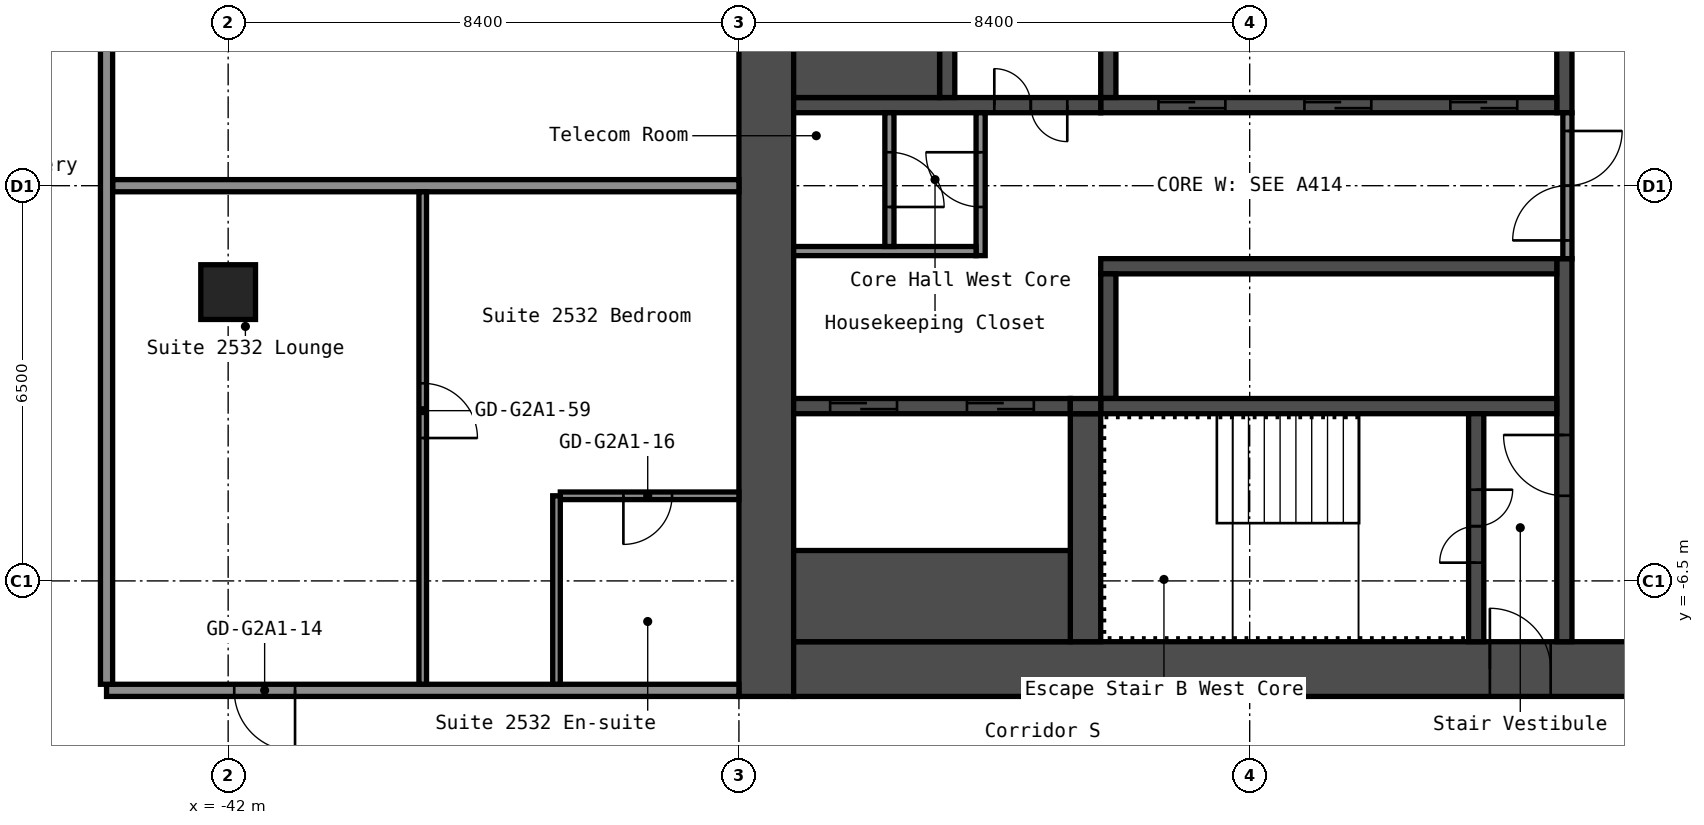
"""IFC4 building model, lengths in metres.
Left out: names, types, materials, properties, quantities, classifications, styles, units other than length and angle.
Written with IfcOpenShell. Run it as: python <this file> out.ifc"""

import sys

from ifc_helpers import new_model, si_unit, direction, frame, frame_2d, origin, origin_2d, place, context, subcontext, project, spatial, rectangle, hollow_rectangle, extrude, element, fill, save


model = new_model("IFC4")
c1 = context("Model", 3, precision=1e-05, world=origin(), true_north=direction((0.0, 1.0)))
c2 = subcontext(c1, "Body", "Model", "MODEL_VIEW")
j1 = project(units=[si_unit("LENGTHUNIT", "METRE"), si_unit("PLANEANGLEUNIT", "RADIAN")], contexts=[c1])
p1 = place(None, origin())
s1 = spatial("IfcSite", under=j1, at=p1, CompositionType="ELEMENT")
p2 = place(p1, origin())
s2 = spatial("IfcBuilding", under=s1, at=p2, CompositionType="ELEMENT")
p3 = place(p2, frame((0.0, 0.0, 91.4)))
s3 = spatial("IfcBuildingStorey", under=s2, at=p3, CompositionType="ELEMENT", Elevation=91.4)
p4 = place(p3, frame((-42.0, -1.75, 0.0), z_axis=(0.0, 0.0, 1.0), x_axis=(1.0, 0.0, 0.0)))
e1 = element("IfcColumn", 1, at=p4, inside=s3, PredefinedType="COLUMN", context=c2, shape_type="SweptSolid", body=[
    extrude(hollow_rectangle(XDim=0.9, YDim=0.9, WallThickness=0.036, at=origin_2d()), origin(), (0.0, 0.0, 1.0), 2.8),
])
p5 = place(p3, frame((-33.15, -8.4, 0.0), z_axis=(0.0, 0.0, 1.0), x_axis=(0.0, 1.0, 0.0)))
e2 = element("IfcWall", 2, at=p5, inside=s3, PredefinedType="SHEAR", context=c2, shape_type="SweptSolid", body=[
    extrude(rectangle(XDim=16.8, YDim=0.9, at=frame_2d((8.4, 0.0))), origin(), (0.0, 0.0, 1.0), 2.8),
])
p6 = place(p3, frame((-32.7, -7.95, 0.0), z_axis=(0.0, 0.0, 1.0), x_axis=(1.0, 0.0, 0.0)))
e3 = element("IfcWall", 3, at=p6, inside=s3, PredefinedType="SHEAR", context=c2, shape_type="SweptSolid", body=[
    extrude(rectangle(XDim=15.0, YDim=0.9, at=frame_2d((7.5, 0.0))), origin(), (0.0, 0.0, 1.0), 2.8),
])
p7 = place(p6, frame((11.45, 0.0, 0.0)))
e4 = element("IfcOpeningElement", 4, at=p7, cuts=e3, PredefinedType="OPENING", context=c2, shape_type="SweptSolid", body=[
    extrude(rectangle(XDim=1.0, YDim=2.1, at=frame_2d((0.5, 1.05))), frame((0.0, 0.46, 0.0), z_axis=(0.0, -1.0, 0.0), x_axis=(1.0, 0.0, 0.0)), (0.0, 0.0, 1.0), 0.92),
])
p8 = place(p3, frame((-20.025, 1.2, 0.0), z_axis=(0.0, 0.0, 1.0), x_axis=(0.0, 1.0, 0.0)))
e5 = element("IfcWall", 5, at=p8, inside=s3, PredefinedType="SHEAR", context=c2, shape_type="SweptSolid", body=[
    extrude(rectangle(XDim=6.3, YDim=0.25, at=frame_2d((3.15, 0.0))), origin(), (0.0, 0.0, 1.0), 2.8),
])
p9 = place(p3, frame((-20.025, -7.5, 0.0), z_axis=(0.0, 0.0, 1.0), x_axis=(0.0, 1.0, 0.0)))
e6 = element("IfcWall", 6, at=p9, inside=s3, PredefinedType="SHEAR", context=c2, shape_type="SweptSolid", body=[
    extrude(rectangle(XDim=6.3, YDim=0.25, at=frame_2d((3.15, 0.0))), origin(), (0.0, 0.0, 1.0), 2.8),
])
p10 = place(p9, frame((2.4, 0.0, 0.0)))
e7 = element("IfcOpeningElement", 7, at=p10, cuts=e6, PredefinedType="OPENING", context=c2, shape_type="SweptSolid", body=[
    extrude(rectangle(XDim=1.0, YDim=2.1, at=frame_2d((0.5, 1.05))), frame((0.0, 0.135, 0.0), z_axis=(0.0, -1.0, 0.0), x_axis=(1.0, 0.0, 0.0)), (0.0, 0.0, 1.0), 0.27),
])
p11 = place(p3, frame((-27.65, 1.325, 0.0), z_axis=(0.0, 0.0, 1.0), x_axis=(1.0, 0.0, 0.0)))
e8 = element("IfcWall", 8, at=p11, inside=s3, PredefinedType="SHEAR", context=c2, shape_type="SweptSolid", body=[
    extrude(rectangle(XDim=7.5, YDim=0.25, at=frame_2d((3.75, 0.0))), origin(), (0.0, 0.0, 1.0), 2.8),
])
p12 = place(p11, frame((5.75, 0.0, 0.0)))
e9 = element("IfcOpeningElement", 9, at=p12, cuts=e8, PredefinedType="OPENING", context=c2, shape_type="SweptSolid", body=[
    extrude(rectangle(XDim=1.1, YDim=2.1, at=frame_2d((0.55, 1.05))), frame((0.0, 0.135, 0.0), z_axis=(0.0, -1.0, 0.0), x_axis=(1.0, 0.0, 0.0)), (0.0, 0.0, 1.0), 0.27),
])
p13 = place(p11, frame((3.35, 0.0, 0.0)))
e10 = element("IfcOpeningElement", 10, at=p13, cuts=e8, PredefinedType="OPENING", context=c2, shape_type="SweptSolid", body=[
    extrude(rectangle(XDim=1.1, YDim=2.1, at=frame_2d((0.55, 1.05))), frame((0.0, 0.135, 0.0), z_axis=(0.0, -1.0, 0.0), x_axis=(1.0, 0.0, 0.0)), (0.0, 0.0, 1.0), 0.27),
])
p14 = place(p11, frame((0.95, 0.0, 0.0)))
e11 = element("IfcOpeningElement", 11, at=p14, cuts=e8, PredefinedType="OPENING", context=c2, shape_type="SweptSolid", body=[
    extrude(rectangle(XDim=1.1, YDim=2.1, at=frame_2d((0.55, 1.05))), frame((0.0, 0.135, 0.0), z_axis=(0.0, -1.0, 0.0), x_axis=(1.0, 0.0, 0.0)), (0.0, 0.0, 1.0), 0.27),
])
p15 = place(p3, frame((-27.525, 1.45, 0.0), z_axis=(0.0, 0.0, 1.0), x_axis=(0.0, 1.0, 0.0)))
e12 = element("IfcWall", 12, at=p15, inside=s3, PredefinedType="SHEAR", context=c2, shape_type="SweptSolid", body=[
    extrude(rectangle(XDim=2.05, YDim=0.25, at=frame_2d((1.025, 0.0))), origin(), (0.0, 0.0, 1.0), 2.8),
])
p16 = place(p3, frame((-32.7, 1.325, 0.0), z_axis=(0.0, 0.0, 1.0), x_axis=(1.0, 0.0, 0.0)))
e13 = element("IfcWall", 13, at=p16, inside=s3, PredefinedType="SHEAR", context=c2, shape_type="SweptSolid", body=[
    extrude(rectangle(XDim=5.05, YDim=0.25, at=frame_2d((2.525, 0.0))), origin(), (0.0, 0.0, 1.0), 2.8),
])
p17 = place(p16, frame((3.3, 0.0, 0.0)))
e14 = element("IfcOpeningElement", 14, at=p17, cuts=e13, PredefinedType="OPENING", context=c2, shape_type="SweptSolid", body=[
    extrude(rectangle(XDim=1.2, YDim=2.1, at=frame_2d((0.6, 1.05))), frame((0.0, 0.135, 0.0), z_axis=(0.0, -1.0, 0.0), x_axis=(1.0, 0.0, 0.0)), (0.0, 0.0, 1.0), 0.27),
])
p18 = place(p3, frame((-30.175, 1.45, 0.0), z_axis=(0.0, 0.0, 1.0), x_axis=(0.0, 1.0, 0.0)))
e15 = element("IfcWall", 15, at=p18, inside=s3, PredefinedType="SHEAR", context=c2, shape_type="SweptSolid", body=[
    extrude(rectangle(XDim=6.05, YDim=0.25, at=frame_2d((3.025, 0.0))), origin(), (0.0, 0.0, 1.0), 2.8),
])
p19 = place(p18, frame((2.625, 0.0, 0.0)))
e16 = element("IfcOpeningElement", 16, at=p19, cuts=e15, PredefinedType="OPENING", context=c2, shape_type="SweptSolid", body=[
    extrude(rectangle(XDim=1.1, YDim=2.1, at=frame_2d((0.55, 1.05))), frame((0.0, 0.135, 0.0), z_axis=(0.0, -1.0, 0.0), x_axis=(1.0, 0.0, 0.0)), (0.0, 0.0, 1.0), 0.27),
])
p20 = place(p3, frame((-32.7, 2.375, 0.0), z_axis=(0.0, 0.0, 1.0), x_axis=(1.0, 0.0, 0.0)))
e17 = element("IfcWall", 17, at=p20, inside=s3, PredefinedType="SHEAR", context=c2, shape_type="SweptSolid", body=[
    extrude(rectangle(XDim=2.4, YDim=1.85, at=frame_2d((1.2, 0.0))), origin(), (0.0, 0.0, 1.0), 2.8),
])
p21 = place(p3, frame((-27.65, -1.325, 0.0), z_axis=(0.0, 0.0, 1.0), x_axis=(1.0, 0.0, 0.0)))
e18 = element("IfcWall", 18, at=p21, inside=s3, PredefinedType="SHEAR", context=c2, shape_type="SweptSolid", body=[
    extrude(rectangle(XDim=7.5, YDim=0.25, at=frame_2d((3.75, 0.0))), origin(), (0.0, 0.0, 1.0), 2.8),
])
p22 = place(p3, frame((-27.525, -3.5, 0.0), z_axis=(0.0, 0.0, 1.0), x_axis=(0.0, 1.0, 0.0)))
e19 = element("IfcWall", 19, at=p22, inside=s3, PredefinedType="SHEAR", context=c2, shape_type="SweptSolid", body=[
    extrude(rectangle(XDim=2.05, YDim=0.25, at=frame_2d((1.025, 0.0))), origin(), (0.0, 0.0, 1.0), 2.8),
])
p23 = place(p3, frame((-27.65, -3.625, 0.0), z_axis=(0.0, 0.0, 1.0), x_axis=(1.0, 0.0, 0.0)))
e20 = element("IfcWall", 20, at=p23, inside=s3, PredefinedType="SHEAR", context=c2, shape_type="SweptSolid", body=[
    extrude(rectangle(XDim=7.5, YDim=0.25, at=frame_2d((3.75, 0.0))), origin(), (0.0, 0.0, 1.0), 2.8),
])
p24 = place(p3, frame((-21.475, -7.5, 0.0), z_axis=(0.0, 0.0, 1.0), x_axis=(0.0, 1.0, 0.0)))
e21 = element("IfcWall", 21, at=p24, inside=s3, PredefinedType="SHEAR", context=c2, shape_type="SweptSolid", body=[
    extrude(rectangle(XDim=3.75, YDim=0.25, at=frame_2d((1.875, 0.0))), origin(), (0.0, 0.0, 1.0), 2.8),
])
p25 = place(p24, frame((1.3, 0.0, 0.0)))
e22 = element("IfcOpeningElement", 22, at=p25, cuts=e21, PredefinedType="OPENING", context=c2, shape_type="SweptSolid", body=[
    extrude(rectangle(XDim=1.2, YDim=2.1, at=frame_2d((0.6, 1.05))), frame((0.0, 0.135, 0.0), z_axis=(0.0, -1.0, 0.0), x_axis=(1.0, 0.0, 0.0)), (0.0, 0.0, 1.0), 0.27),
])
p26 = place(p3, frame((-27.9, -7.5, 0.0), z_axis=(0.0, 0.0, 1.0), x_axis=(0.0, 1.0, 0.0)))
e23 = element("IfcWall", 23, at=p26, inside=s3, PredefinedType="SHEAR", context=c2, shape_type="SweptSolid", body=[
    extrude(rectangle(XDim=3.75, YDim=0.5, at=frame_2d((1.875, 0.0))), origin(), (0.0, 0.0, 1.0), 2.8),
])
p27 = place(p3, frame((-32.7, -3.625, 0.0), z_axis=(0.0, 0.0, 1.0), x_axis=(1.0, 0.0, 0.0)))
e24 = element("IfcWall", 24, at=p27, inside=s3, PredefinedType="SHEAR", context=c2, shape_type="SweptSolid", body=[
    extrude(rectangle(XDim=4.55, YDim=0.25, at=frame_2d((2.275, 0.0))), origin(), (0.0, 0.0, 1.0), 2.8),
])
p28 = place(p27, frame((2.85, 0.0, 0.0)))
e25 = element("IfcOpeningElement", 25, at=p28, cuts=e24, PredefinedType="OPENING", context=c2, shape_type="SweptSolid", body=[
    extrude(rectangle(XDim=1.1, YDim=2.1, at=frame_2d((0.55, 1.05))), frame((0.0, 0.135, 0.0), z_axis=(0.0, -1.0, 0.0), x_axis=(1.0, 0.0, 0.0)), (0.0, 0.0, 1.0), 0.27),
])
p29 = place(p27, frame((0.6, 0.0, 0.0)))
e26 = element("IfcOpeningElement", 26, at=p29, cuts=e24, PredefinedType="OPENING", context=c2, shape_type="SweptSolid", body=[
    extrude(rectangle(XDim=1.1, YDim=2.1, at=frame_2d((0.55, 1.05))), frame((0.0, 0.135, 0.0), z_axis=(0.0, -1.0, 0.0), x_axis=(1.0, 0.0, 0.0)), (0.0, 0.0, 1.0), 0.27),
])
p30 = place(p3, frame((-32.7, -6.75, 0.0), z_axis=(0.0, 0.0, 1.0), x_axis=(1.0, 0.0, 0.0)))
e27 = element("IfcWall", 27, at=p30, inside=s3, PredefinedType="SHEAR", context=c2, shape_type="SweptSolid", body=[
    extrude(rectangle(XDim=4.55, YDim=1.5, at=frame_2d((2.275, 0.0))), origin(), (0.0, 0.0, 1.0), 2.8),
])
p31 = place(p3, frame((-28.15, -3.625, 0.0), z_axis=(0.0, 0.0, 1.0), x_axis=(1.0, 0.0, 0.0)))
e28 = element("IfcWall", 28, at=p31, inside=s3, PredefinedType="SHEAR", context=c2, shape_type="SweptSolid", body=[
    extrude(rectangle(XDim=0.5, YDim=0.25, at=frame_2d((0.25, 0.0))), origin(), (0.0, 0.0, 1.0), 2.8),
])
p32 = place(p3, frame((-19.975, -1.2, 0.0), z_axis=(0.0, 0.0, 1.0), x_axis=(0.0, 1.0, 0.0)))
e29 = element("IfcWall", 29, at=p32, inside=s3, PredefinedType="PARTITIONING", context=c2, shape_type="SweptSolid", body=[
    extrude(rectangle(XDim=2.4, YDim=0.15, at=frame_2d((1.2, 0.0))), origin(), (0.0, 0.0, 1.0), 2.8),
])
p33 = place(p32, frame((0.3, 0.0, 0.0)))
e30 = element("IfcOpeningElement", 30, at=p33, cuts=e29, PredefinedType="OPENING", context=c2, shape_type="SweptSolid", body=[
    extrude(rectangle(XDim=1.8, YDim=2.1, at=frame_2d((0.9, 1.05))), frame((0.0, 0.085, 0.0), z_axis=(0.0, -1.0, 0.0), x_axis=(1.0, 0.0, 0.0)), (0.0, 0.0, 1.0), 0.17),
])
p34 = place(p3, frame((-29.625, -1.15, 0.0), z_axis=(0.0, 0.0, 1.0), x_axis=(0.0, 1.0, 0.0)))
e31 = element("IfcWall", 31, at=p34, inside=s3, PredefinedType="PARTITIONING", context=c2, shape_type="SweptSolid", body=[
    extrude(rectangle(XDim=2.35, YDim=0.15, at=frame_2d((1.175, 0.0))), origin(), (0.0, 0.0, 1.0), 2.8),
])
p35 = place(p34, frame((0.8, 0.0, 0.0)))
e32 = element("IfcOpeningElement", 32, at=p35, cuts=e31, PredefinedType="OPENING", context=c2, shape_type="SweptSolid", body=[
    extrude(rectangle(XDim=0.9, YDim=2.1, at=frame_2d((0.45, 1.05))), frame((0.0, 0.085, 0.0), z_axis=(0.0, -1.0, 0.0), x_axis=(1.0, 0.0, 0.0)), (0.0, 0.0, 1.0), 0.17),
])
p36 = place(p3, frame((-32.7, -1.075, 0.0), z_axis=(0.0, 0.0, 1.0), x_axis=(1.0, 0.0, 0.0)))
e33 = element("IfcWall", 33, at=p36, inside=s3, PredefinedType="PARTITIONING", context=c2, shape_type="SweptSolid", body=[
    extrude(rectangle(XDim=3.0, YDim=0.15, at=frame_2d((1.5, 0.0))), origin(), (0.0, 0.0, 1.0), 2.8),
])
p37 = place(p3, frame((-31.125, -1.0, 0.0), z_axis=(0.0, 0.0, 1.0), x_axis=(0.0, 1.0, 0.0)))
e34 = element("IfcWall", 34, at=p37, inside=s3, PredefinedType="PARTITIONING", context=c2, shape_type="SweptSolid", body=[
    extrude(rectangle(XDim=2.2, YDim=0.15, at=frame_2d((1.1, 0.0))), origin(), (0.0, 0.0, 1.0), 2.8),
])
p38 = place(p37, frame((0.65, 0.0, 0.0)))
e35 = element("IfcOpeningElement", 35, at=p38, cuts=e34, PredefinedType="OPENING", context=c2, shape_type="SweptSolid", body=[
    extrude(rectangle(XDim=0.9, YDim=2.1, at=frame_2d((0.45, 1.05))), frame((0.0, 0.085, 0.0), z_axis=(0.0, -1.0, 0.0), x_axis=(1.0, 0.0, 0.0)), (0.0, 0.0, 1.0), 0.17),
])
p39 = place(p3, frame((-44.0, -8.3, 0.0), z_axis=(0.0, 0.0, 1.0), x_axis=(1.0, 0.0, 0.0)))
e36 = element("IfcWall", 36, at=p39, inside=s3, PredefinedType="PARTITIONING", context=c2, shape_type="SweptSolid", body=[
    extrude(rectangle(XDim=10.4, YDim=0.2, at=frame_2d((5.2, 0.0))), origin(), (0.0, 0.0, 1.0), 2.8),
])
p40 = place(p39, frame((2.1, 0.0, 0.0)))
e37 = element("IfcOpeningElement", 37, at=p40, cuts=e36, PredefinedType="OPENING", context=c2, shape_type="SweptSolid", body=[
    extrude(rectangle(XDim=1.0, YDim=2.1, at=frame_2d((0.5, 1.05))), frame((0.0, 0.11, 0.0), z_axis=(0.0, -1.0, 0.0), x_axis=(1.0, 0.0, 0.0)), (0.0, 0.0, 1.0), 0.22),
])
p41 = place(p3, frame((-36.538, -5.1, 0.0), z_axis=(0.0, 0.0, 1.0), x_axis=(1.0, 0.0, 0.0)))
e38 = element("IfcWall", 38, at=p41, inside=s3, PredefinedType="PARTITIONING", context=c2, shape_type="SweptSolid", body=[
    extrude(rectangle(XDim=2.938, YDim=0.125, at=frame_2d((1.469, 0.0))), origin(), (0.0, 0.0, 1.0), 2.8),
])
p42 = place(p41, frame((1.038, 0.0, 0.0)))
e39 = element("IfcOpeningElement", 39, at=p42, cuts=e38, PredefinedType="OPENING", context=c2, shape_type="SweptSolid", body=[
    extrude(rectangle(XDim=0.8, YDim=2.1, at=frame_2d((0.4, 1.05))), frame((0.0, 0.073, 0.0), z_axis=(0.0, -1.0, 0.0), x_axis=(1.0, 0.0, 0.0)), (0.0, 0.0, 1.0), 0.145),
])
p43 = place(p3, frame((-43.9, 0.0, 0.0), z_axis=(0.0, 0.0, 1.0), x_axis=(1.0, 0.0, 0.0)))
e40 = element("IfcWall", 40, at=p43, inside=s3, PredefinedType="PARTITIONING", context=c2, shape_type="SweptSolid", body=[
    extrude(rectangle(XDim=10.3, YDim=0.2, at=frame_2d((5.15, 0.0))), origin(), (0.0, 0.0, 1.0), 2.8),
])
p44 = place(p3, frame((-44.0, -8.2, 0.0), z_axis=(0.0, 0.0, 1.0), x_axis=(0.0, 1.0, 0.0)))
e41 = element("IfcWall", 41, at=p44, inside=s3, PredefinedType="PARTITIONING", context=c2, shape_type="SweptSolid", body=[
    extrude(rectangle(XDim=16.4, YDim=0.2, at=frame_2d((8.2, 0.0))), origin(), (0.0, 0.0, 1.0), 2.8),
])
p45 = place(p3, frame((-38.8, -8.2, 0.0), z_axis=(0.0, 0.0, 1.0), x_axis=(0.0, 1.0, 0.0)))
e42 = element("IfcWall", 42, at=p45, inside=s3, PredefinedType="PARTITIONING", context=c2, shape_type="SweptSolid", body=[
    extrude(rectangle(XDim=8.1, YDim=0.125, at=frame_2d((4.05, 0.0))), origin(), (0.0, 0.0, 1.0), 2.8),
])
p46 = place(p45, frame((4.05, 0.0, 0.0)))
e43 = element("IfcOpeningElement", 43, at=p46, cuts=e42, PredefinedType="OPENING", context=c2, shape_type="SweptSolid", body=[
    extrude(rectangle(XDim=0.9, YDim=2.1, at=frame_2d((0.45, 1.05))), frame((0.0, 0.073, 0.0), z_axis=(0.0, -1.0, 0.0), x_axis=(1.0, 0.0, 0.0)), (0.0, 0.0, 1.0), 0.145),
])
p47 = place(p3, frame((-36.6, -8.2, 0.0), z_axis=(0.0, 0.0, 1.0), x_axis=(0.0, 1.0, 0.0)))
e44 = element("IfcWall", 44, at=p47, inside=s3, PredefinedType="PARTITIONING", context=c2, shape_type="SweptSolid", body=[
    extrude(rectangle(XDim=3.1, YDim=0.125, at=frame_2d((1.55, 0.0))), origin(), (0.0, 0.0, 1.0), 2.8),
])
p48 = place(p7, origin())
e45 = element("IfcDoor", 45, at=p48, inside=s3, OperationType="SINGLE_SWING_RIGHT", PredefinedType="DOOR", context=c2, shape_type="SweptSolid", body=[
    extrude(rectangle(XDim=1.0, YDim=2.1, at=frame_2d((0.5, 1.05))), frame((0.0, 0.025, 0.0), z_axis=(0.0, -1.0, 0.0), x_axis=(1.0, 0.0, 0.0)), (0.0, 0.0, 1.0), 0.05),
])
fill(e4, e45)
p49 = place(p25, origin())
e46 = element("IfcDoor", 46, at=p49, inside=s3, OperationType="DOUBLE_DOOR_SINGLE_SWING", PredefinedType="DOOR", context=c2, shape_type="SweptSolid", body=[
    extrude(rectangle(XDim=1.2, YDim=2.1, at=frame_2d((0.6, 1.05))), frame((0.0, 0.025, 0.0), z_axis=(0.0, -1.0, 0.0), x_axis=(1.0, 0.0, 0.0)), (0.0, 0.0, 1.0), 0.05),
])
fill(e22, e46)
p50 = place(p10, origin())
e47 = element("IfcDoor", 47, at=p50, inside=s3, OperationType="SINGLE_SWING_LEFT", PredefinedType="DOOR", context=c2, shape_type="SweptSolid", body=[
    extrude(rectangle(XDim=1.0, YDim=2.1, at=frame_2d((0.5, 1.05))), frame((0.0, 0.025, 0.0), z_axis=(0.0, -1.0, 0.0), x_axis=(1.0, 0.0, 0.0)), (0.0, 0.0, 1.0), 0.05),
])
fill(e7, e47)
p51 = place(p17, origin())
e48 = element("IfcDoor", 48, at=p51, inside=s3, OperationType="DOUBLE_DOOR_SINGLE_SWING", PredefinedType="DOOR", context=c2, shape_type="SweptSolid", body=[
    extrude(rectangle(XDim=1.2, YDim=2.1, at=frame_2d((0.6, 1.05))), frame((0.0, 0.025, 0.0), z_axis=(0.0, -1.0, 0.0), x_axis=(1.0, 0.0, 0.0)), (0.0, 0.0, 1.0), 0.05),
])
fill(e14, e48)
p52 = place(p33, origin())
e49 = element("IfcDoor", 49, at=p52, inside=s3, OperationType="DOUBLE_DOOR_SINGLE_SWING", PredefinedType="DOOR", context=c2, shape_type="SweptSolid", body=[
    extrude(rectangle(XDim=1.8, YDim=2.1, at=frame_2d((0.9, 1.05))), frame((0.0, 0.025, 0.0), z_axis=(0.0, -1.0, 0.0), x_axis=(1.0, 0.0, 0.0)), (0.0, 0.0, 1.0), 0.05),
])
fill(e30, e49)
p53 = place(p35, origin())
e50 = element("IfcDoor", 50, at=p53, inside=s3, OperationType="SINGLE_SWING_LEFT", PredefinedType="DOOR", context=c2, shape_type="SweptSolid", body=[
    extrude(rectangle(XDim=0.9, YDim=2.1, at=frame_2d((0.45, 1.05))), frame((0.0, 0.025, 0.0), z_axis=(0.0, -1.0, 0.0), x_axis=(1.0, 0.0, 0.0)), (0.0, 0.0, 1.0), 0.05),
])
fill(e32, e50)
p54 = place(p38, origin())
e51 = element("IfcDoor", 51, at=p54, inside=s3, OperationType="SINGLE_SWING_LEFT", PredefinedType="DOOR", context=c2, shape_type="SweptSolid", body=[
    extrude(rectangle(XDim=0.9, YDim=2.1, at=frame_2d((0.45, 1.05))), frame((0.0, 0.025, 0.0), z_axis=(0.0, -1.0, 0.0), x_axis=(1.0, 0.0, 0.0)), (0.0, 0.0, 1.0), 0.05),
])
fill(e35, e51)
p55 = place(p12, origin())
e52 = element("IfcDoor", 52, at=p55, inside=s3, OperationType="DOUBLE_DOOR_SLIDING", PredefinedType="DOOR", context=c2, shape_type="SweptSolid", body=[
    extrude(rectangle(XDim=1.1, YDim=2.1, at=frame_2d((0.55, 1.05))), frame((0.0, 0.025, 0.0), z_axis=(0.0, -1.0, 0.0), x_axis=(1.0, 0.0, 0.0)), (0.0, 0.0, 1.0), 0.05),
])
fill(e9, e52)
p56 = place(p13, origin())
e53 = element("IfcDoor", 53, at=p56, inside=s3, OperationType="DOUBLE_DOOR_SLIDING", PredefinedType="DOOR", context=c2, shape_type="SweptSolid", body=[
    extrude(rectangle(XDim=1.1, YDim=2.1, at=frame_2d((0.55, 1.05))), frame((0.0, 0.025, 0.0), z_axis=(0.0, -1.0, 0.0), x_axis=(1.0, 0.0, 0.0)), (0.0, 0.0, 1.0), 0.05),
])
fill(e10, e53)
p57 = place(p14, origin())
e54 = element("IfcDoor", 54, at=p57, inside=s3, OperationType="DOUBLE_DOOR_SLIDING", PredefinedType="DOOR", context=c2, shape_type="SweptSolid", body=[
    extrude(rectangle(XDim=1.1, YDim=2.1, at=frame_2d((0.55, 1.05))), frame((0.0, 0.025, 0.0), z_axis=(0.0, -1.0, 0.0), x_axis=(1.0, 0.0, 0.0)), (0.0, 0.0, 1.0), 0.05),
])
fill(e11, e54)
p58 = place(p28, origin())
e55 = element("IfcDoor", 55, at=p58, inside=s3, OperationType="DOUBLE_DOOR_SLIDING", PredefinedType="DOOR", context=c2, shape_type="SweptSolid", body=[
    extrude(rectangle(XDim=1.1, YDim=2.1, at=frame_2d((0.55, 1.05))), frame((0.0, 0.025, 0.0), z_axis=(0.0, -1.0, 0.0), x_axis=(1.0, 0.0, 0.0)), (0.0, 0.0, 1.0), 0.05),
])
fill(e25, e55)
p59 = place(p29, origin())
e56 = element("IfcDoor", 56, at=p59, inside=s3, OperationType="DOUBLE_DOOR_SLIDING", PredefinedType="DOOR", context=c2, shape_type="SweptSolid", body=[
    extrude(rectangle(XDim=1.1, YDim=2.1, at=frame_2d((0.55, 1.05))), frame((0.0, 0.025, 0.0), z_axis=(0.0, -1.0, 0.0), x_axis=(1.0, 0.0, 0.0)), (0.0, 0.0, 1.0), 0.05),
])
fill(e26, e56)
p60 = place(p40, origin())
e57 = element("IfcDoor", 57, at=p60, inside=s3, OperationType="SINGLE_SWING_RIGHT", PredefinedType="DOOR", context=c2, shape_type="SweptSolid", body=[
    extrude(rectangle(XDim=1.0, YDim=2.1, at=frame_2d((0.5, 1.05))), frame((0.0, 0.025, 0.0), z_axis=(0.0, -1.0, 0.0), x_axis=(1.0, 0.0, 0.0)), (0.0, 0.0, 1.0), 0.05),
])
fill(e37, e57)
p61 = place(p42, origin())
e58 = element("IfcDoor", 58, at=p61, inside=s3, OperationType="SINGLE_SWING_LEFT", PredefinedType="DOOR", context=c2, shape_type="SweptSolid", body=[
    extrude(rectangle(XDim=0.8, YDim=2.1, at=frame_2d((0.4, 1.05))), frame((0.0, 0.025, 0.0), z_axis=(0.0, -1.0, 0.0), x_axis=(1.0, 0.0, 0.0)), (0.0, 0.0, 1.0), 0.05),
])
fill(e39, e58)
p62 = place(p46, origin())
e59 = element("IfcDoor", 59, at=p62, inside=s3, OperationType="SINGLE_SWING_LEFT", PredefinedType="DOOR", context=c2, shape_type="SweptSolid", body=[
    extrude(rectangle(XDim=0.9, YDim=2.1, at=frame_2d((0.45, 1.05))), frame((0.0, 0.025, 0.0), z_axis=(0.0, -1.0, 0.0), x_axis=(1.0, 0.0, 0.0)), (0.0, 0.0, 1.0), 0.05),
])
fill(e43, e59)
save(model, sys.argv[1])
